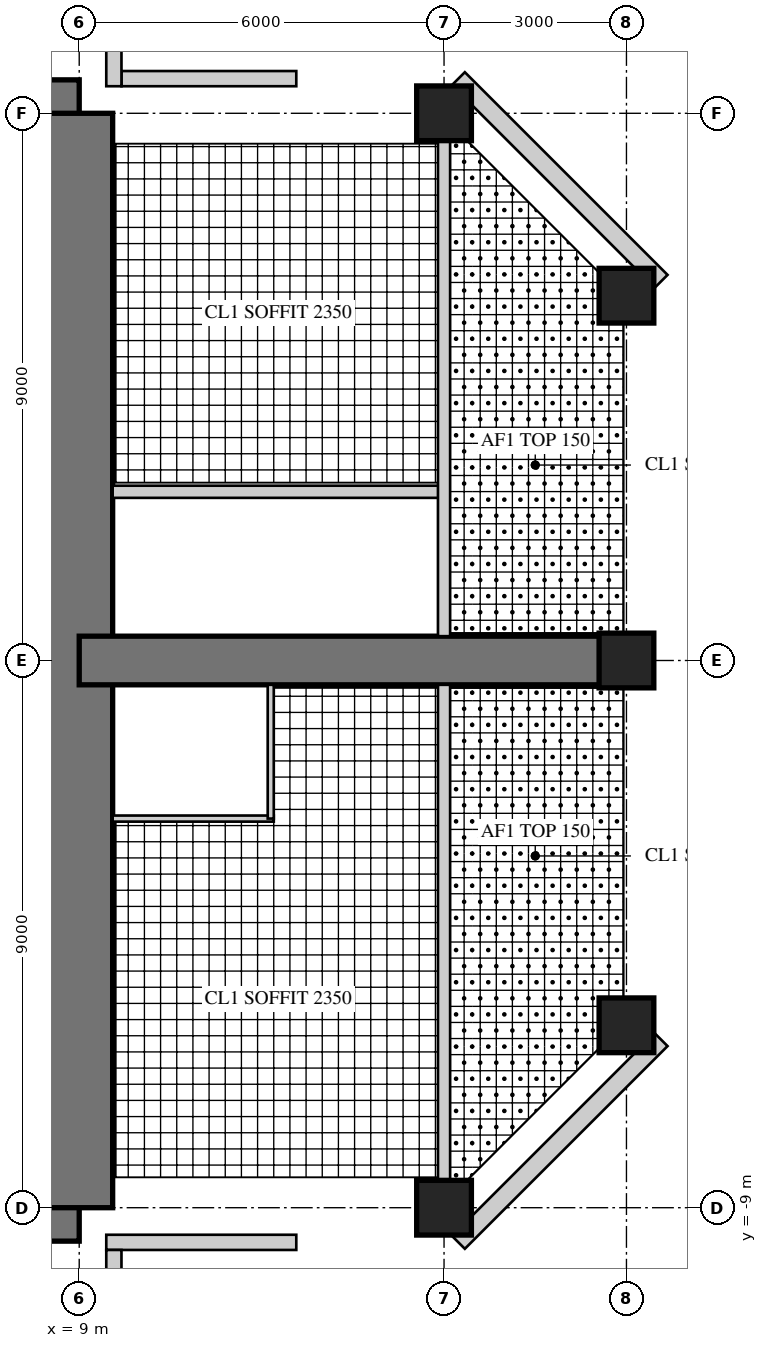
"""IFC4 building model, lengths in metres.
Left out: names, types, materials, properties, quantities, classifications, styles, units other than length and angle.
Written with IfcOpenShell. Run it as: python <this file> out.ifc"""

import sys

from ifc_helpers import new_model, si_unit, direction, frame, frame_2d, origin, origin_2d, place, context, subcontext, project, spatial, rectangle, hollow_rectangle, extrude, element, fill, save


model = new_model("IFC4")
c1 = context("Model", 3, precision=1e-05, world=origin(), true_north=direction((0.0, 1.0)))
c2 = subcontext(c1, "Body", "Model", "MODEL_VIEW")
j1 = project(units=[si_unit("LENGTHUNIT", "METRE"), si_unit("PLANEANGLEUNIT", "RADIAN")], contexts=[c1])
p1 = place(None, origin())
s1 = spatial("IfcSite", under=j1, at=p1, CompositionType="ELEMENT")
p2 = place(p1, origin())
s2 = spatial("IfcBuilding", under=s1, at=p2, CompositionType="ELEMENT")
p3 = place(p2, frame((0.0, 0.0, 189.9)))
s3 = spatial("IfcBuildingStorey", under=s2, at=p3, CompositionType="ELEMENT", Elevation=189.9)
p4 = place(p3, frame((9.0, 9.0, 0.0), z_axis=(0.0, 0.0, 1.0), x_axis=(-1.0, 0.0, 0.0)))
e1 = element("IfcWall", 1, at=p4, inside=s3, PredefinedType="SHEAR", context=c2, shape_type="SweptSolid", body=[
    extrude(rectangle(XDim=18.0, YDim=1.1, at=frame_2d((9.0, 0.0))), origin(), (0.0, 0.0, 1.0), 3.4),
])
p5 = place(p4, frame((9.8, 0.0, 0.0)))
e2 = element("IfcOpeningElement", 2, at=p5, cuts=e1, PredefinedType="OPENING", context=c2, shape_type="SweptSolid", body=[
    extrude(rectangle(XDim=1.0, YDim=2.4, at=frame_2d((0.5, 1.2))), frame((0.0, 0.56, 0.0), z_axis=(0.0, -1.0, 0.0), x_axis=(1.0, 0.0, 0.0)), (0.0, 0.0, 1.0), 1.12),
])
p6 = place(p3, frame((-9.0, -9.0, 0.0), z_axis=(0.0, 0.0, 1.0), x_axis=(1.0, 0.0, 0.0)))
e3 = element("IfcWall", 3, at=p6, inside=s3, PredefinedType="SHEAR", context=c2, shape_type="SweptSolid", body=[
    extrude(rectangle(XDim=18.0, YDim=1.1, at=frame_2d((9.0, 0.0))), origin(), (0.0, 0.0, 1.0), 3.4),
])
p7 = place(p6, frame((9.8, 0.0, 0.0)))
e4 = element("IfcOpeningElement", 4, at=p7, cuts=e3, PredefinedType="OPENING", context=c2, shape_type="SweptSolid", body=[
    extrude(rectangle(XDim=1.0, YDim=2.4, at=frame_2d((0.5, 1.2))), frame((0.0, 0.56, 0.0), z_axis=(0.0, -1.0, 0.0), x_axis=(1.0, 0.0, 0.0)), (0.0, 0.0, 1.0), 1.12),
])
p8 = place(p3, frame((9.0, -9.0, 0.0), z_axis=(0.0, 0.0, 1.0), x_axis=(0.0, 1.0, 0.0)))
e5 = element("IfcWall", 5, at=p8, inside=s3, PredefinedType="SHEAR", context=c2, shape_type="SweptSolid", body=[
    extrude(rectangle(XDim=18.0, YDim=1.1, at=frame_2d((9.0, 0.0))), origin(), (0.0, 0.0, 1.0), 3.4),
])
p9 = place(p8, frame((9.8, 0.0, 0.0)))
e6 = element("IfcOpeningElement", 6, at=p9, cuts=e5, PredefinedType="OPENING", context=c2, shape_type="SweptSolid", body=[
    extrude(rectangle(XDim=1.0, YDim=2.4, at=frame_2d((0.5, 1.2))), frame((0.0, 0.56, 0.0), z_axis=(0.0, -1.0, 0.0), x_axis=(1.0, 0.0, 0.0)), (0.0, 0.0, 1.0), 1.12),
])
p10 = place(p3, frame((9.0, 0.0, 0.0), z_axis=(0.0, 0.0, 1.0), x_axis=(1.0, 0.0, 0.0)))
e7 = element("IfcWall", 7, at=p10, inside=s3, PredefinedType="SHEAR", context=c2, shape_type="SweptSolid", body=[
    extrude(rectangle(XDim=9.0, YDim=0.8, at=frame_2d((4.5, 0.0))), origin(), (0.0, 0.0, 1.0), 3.4),
])
p11 = place(p10, frame((3.95, 0.0, 0.0)))
e8 = element("IfcOpeningElement", 8, at=p11, cuts=e7, PredefinedType="OPENING", context=c2, shape_type="SweptSolid", body=[
    extrude(rectangle(XDim=1.0, YDim=2.15, at=frame_2d((0.5, 1.075))), frame((0.0, 0.41, 0.0), z_axis=(0.0, -1.0, 0.0), x_axis=(1.0, 0.0, 0.0)), (0.0, 0.0, 1.0), 0.82),
])
p12 = place(p10, frame((7.0, 0.0, 0.0)))
e9 = element("IfcOpeningElement", 9, at=p12, cuts=e7, PredefinedType="OPENING", context=c2, shape_type="SweptSolid", body=[
    extrude(rectangle(XDim=1.0, YDim=2.2, at=frame_2d((0.5, 1.1))), frame((0.0, 0.41, 0.0), z_axis=(0.0, -1.0, 0.0), x_axis=(1.0, 0.0, 0.0)), (0.0, 0.0, 1.0), 0.82),
])
for number, where, z_axis, x_axis in (
    (10, (15.0, -9.0, 0.0), (0.0, 0.0, 1.0), (1.0, 0.0, 0.0)),
    (11, (15.0, 9.0, 0.0), (0.0, 0.0, 1.0), (1.0, 0.0, 0.0)),
    (12, (18.0, -6.0, 0.0), (0.0, 0.0, 1.0), (1.0, 0.0, 0.0)),
    (13, (18.0, 0.0, 0.0), (0.0, 0.0, 1.0), (1.0, 0.0, 0.0)),
    (14, (18.0, 6.0, 0.0), (0.0, 0.0, 1.0), (1.0, 0.0, 0.0)),
):
    element("IfcColumn", number, at=place(p3, frame(where, z_axis=z_axis, x_axis=x_axis)), inside=s3, PredefinedType="COLUMN", context=c2, shape_type="SweptSolid", body=[
        extrude(rectangle(XDim=0.9, YDim=0.9, at=origin_2d()), origin(), (0.0, 0.0, 1.0), 3.4),
    ])
p13 = place(p3, frame((9.445, -9.57, 0.0), z_axis=(0.0, 0.0, 1.0), x_axis=(1.0, 0.0, 0.0)))
e15 = element("IfcWall", 15, at=p13, inside=s3, PredefinedType="SOLIDWALL", context=c2, shape_type="SweptSolid", body=[
    extrude(rectangle(XDim=3.125, YDim=0.25, at=frame_2d((1.562, 0.0))), origin(), (0.0, 0.0, 1.0), 3.22),
])
p14 = place(p13, frame((0.6, 0.0, 0.0)))
e16 = element("IfcOpeningElement", 16, at=p14, cuts=e15, PredefinedType="OPENING", context=c2, shape_type="SweptSolid", body=[
    extrude(rectangle(XDim=1.0, YDim=2.2, at=frame_2d((0.5, 1.1))), frame((0.0, 0.135, 0.0), z_axis=(0.0, -1.0, 0.0), x_axis=(1.0, 0.0, 0.0)), (0.0, 0.0, 1.0), 0.27),
])
p15 = place(p3, frame((15.236, -9.57, 0.0), z_axis=(0.0, 0.0, 1.0), x_axis=(0.707106781187, 0.707106781187, 0.0)))
e17 = element("IfcWall", 17, at=p15, inside=s3, PredefinedType="SOLIDWALL", context=c2, shape_type="SweptSolid", body=[
    extrude(rectangle(XDim=4.715, YDim=0.3, at=frame_2d((2.357, 0.0))), origin(), (0.0, 0.0, 1.0), 3.22),
])
p16 = place(p15, frame((1.907, 0.0, 0.3)))
e18 = element("IfcOpeningElement", 18, at=p16, cuts=e17, PredefinedType="OPENING", context=c2, shape_type="SweptSolid", body=[
    extrude(rectangle(XDim=0.9, YDim=2.4, at=frame_2d((0.45, 1.2))), frame((0.0, 0.16, 0.0), z_axis=(0.0, -1.0, 0.0), x_axis=(1.0, 0.0, 0.0)), (0.0, 0.0, 1.0), 0.32),
])
p17 = place(p3, frame((18.57, 6.236, 0.0), z_axis=(0.0, 0.0, 1.0), x_axis=(-0.707106781187, 0.707106781187, 0.0)))
e19 = element("IfcWall", 19, at=p17, inside=s3, PredefinedType="SOLIDWALL", context=c2, shape_type="SweptSolid", body=[
    extrude(rectangle(XDim=4.715, YDim=0.3, at=frame_2d((2.357, 0.0))), origin(), (0.0, 0.0, 1.0), 3.22),
])
p18 = place(p17, frame((1.907, 0.0, 0.3)))
e20 = element("IfcOpeningElement", 20, at=p18, cuts=e19, PredefinedType="OPENING", context=c2, shape_type="SweptSolid", body=[
    extrude(rectangle(XDim=0.9, YDim=2.4, at=frame_2d((0.45, 1.2))), frame((0.0, 0.16, 0.0), z_axis=(0.0, -1.0, 0.0), x_axis=(1.0, 0.0, 0.0)), (0.0, 0.0, 1.0), 0.32),
])
p19 = place(p3, frame((12.57, 9.57, 0.0), z_axis=(0.0, 0.0, 1.0), x_axis=(-1.0, 0.0, 0.0)))
e21 = element("IfcWall", 21, at=p19, inside=s3, PredefinedType="SOLIDWALL", context=c2, shape_type="SweptSolid", body=[
    extrude(rectangle(XDim=2.875, YDim=0.25, at=frame_2d((1.438, 0.0))), origin(), (0.0, 0.0, 1.0), 3.22),
])
p20 = place(p19, frame((0.6, 0.0, 0.0)))
e22 = element("IfcOpeningElement", 22, at=p20, cuts=e21, PredefinedType="OPENING", context=c2, shape_type="SweptSolid", body=[
    extrude(rectangle(XDim=1.0, YDim=2.2, at=frame_2d((0.5, 1.1))), frame((0.0, 0.135, 0.0), z_axis=(0.0, -1.0, 0.0), x_axis=(1.0, 0.0, 0.0)), (0.0, 0.0, 1.0), 0.27),
])
p21 = place(p3, frame((9.57, 9.445, 0.0), z_axis=(0.0, 0.0, 1.0), x_axis=(0.0, 1.0, 0.0)))
e23 = element("IfcWall", 23, at=p21, inside=s3, PredefinedType="SOLIDWALL", context=c2, shape_type="SweptSolid", body=[
    extrude(rectangle(XDim=3.125, YDim=0.25, at=frame_2d((1.562, 0.0))), origin(), (0.0, 0.0, 1.0), 3.22),
])
p22 = place(p21, frame((0.6, 0.0, 0.0)))
e24 = element("IfcOpeningElement", 24, at=p22, cuts=e23, PredefinedType="OPENING", context=c2, shape_type="SweptSolid", body=[
    extrude(rectangle(XDim=1.0, YDim=2.2, at=frame_2d((0.5, 1.1))), frame((0.0, 0.135, 0.0), z_axis=(0.0, -1.0, 0.0), x_axis=(1.0, 0.0, 0.0)), (0.0, 0.0, 1.0), 0.27),
])
p23 = place(p3, frame((9.57, -12.57, 0.0), z_axis=(0.0, 0.0, 1.0), x_axis=(0.0, 1.0, 0.0)))
e25 = element("IfcWall", 25, at=p23, inside=s3, PredefinedType="SOLIDWALL", context=c2, shape_type="SweptSolid", body=[
    extrude(rectangle(XDim=2.875, YDim=0.25, at=frame_2d((1.438, 0.0))), origin(), (0.0, 0.0, 1.0), 3.22),
])
p24 = place(p23, frame((0.6, 0.0, 0.0)))
e26 = element("IfcOpeningElement", 26, at=p24, cuts=e25, PredefinedType="OPENING", context=c2, shape_type="SweptSolid", body=[
    extrude(rectangle(XDim=1.0, YDim=2.2, at=frame_2d((0.5, 1.1))), frame((0.0, 0.135, 0.0), z_axis=(0.0, -1.0, 0.0), x_axis=(1.0, 0.0, 0.0)), (0.0, 0.0, 1.0), 0.27),
])
p25 = place(p3, frame((9.55, -2.6, 0.0), z_axis=(0.0, 0.0, 1.0), x_axis=(1.0, 0.0, 0.0)))
e27 = element("IfcWall", 27, at=p25, inside=s3, PredefinedType="PARTITIONING", context=c2, shape_type="SweptSolid", body=[
    extrude(rectangle(XDim=2.65, YDim=0.1, at=frame_2d((1.325, 0.0))), origin(), (0.0, 0.0, 1.0), 3.22),
])
p26 = place(p3, frame((12.15, -2.6, 0.0), z_axis=(0.0, 0.0, 1.0), x_axis=(0.0, 1.0, 0.0)))
e28 = element("IfcWall", 28, at=p26, inside=s3, PredefinedType="PARTITIONING", context=c2, shape_type="SweptSolid", body=[
    extrude(rectangle(XDim=2.2, YDim=0.1, at=frame_2d((1.1, 0.0))), origin(), (0.0, 0.0, 1.0), 3.22),
])
p27 = place(p26, frame((0.55, 0.0, 0.0)))
e29 = element("IfcOpeningElement", 29, at=p27, cuts=e28, PredefinedType="OPENING", context=c2, shape_type="SweptSolid", body=[
    extrude(rectangle(XDim=0.9, YDim=2.1, at=frame_2d((0.45, 1.05))), frame((0.0, 0.06, 0.0), z_axis=(0.0, -1.0, 0.0), x_axis=(1.0, 0.0, 0.0)), (0.0, 0.0, 1.0), 0.12),
])
p28 = place(p3, frame((9.55, 2.775, 0.0), z_axis=(0.0, 0.0, 1.0), x_axis=(1.0, 0.0, 0.0)))
e30 = element("IfcWall", 30, at=p28, inside=s3, PredefinedType="SOLIDWALL", context=c2, shape_type="SweptSolid", body=[
    extrude(rectangle(XDim=5.45, YDim=0.2, at=frame_2d((2.725, 0.0))), origin(), (0.0, 0.0, 1.0), 3.22),
])
p29 = place(p28, frame((1.2, 0.0, 0.0)))
e31 = element("IfcOpeningElement", 31, at=p29, cuts=e30, PredefinedType="OPENING", context=c2, shape_type="SweptSolid", body=[
    extrude(rectangle(XDim=1.0, YDim=2.2, at=frame_2d((0.5, 1.1))), frame((0.0, 0.11, 0.0), z_axis=(0.0, -1.0, 0.0), x_axis=(1.0, 0.0, 0.0)), (0.0, 0.0, 1.0), 0.22),
])
p30 = place(p3, frame((15.0, -8.55, 0.0), z_axis=(0.0, 0.0, 1.0), x_axis=(0.0, 1.0, 0.0)))
e32 = element("IfcWall", 32, at=p30, inside=s3, PredefinedType="SOLIDWALL", context=c2, shape_type="SweptSolid", body=[
    extrude(rectangle(XDim=8.15, YDim=0.2, at=frame_2d((4.075, 0.0))), origin(), (0.0, 0.0, 1.0), 2.47),
])
p31 = place(p3, frame((15.0, 0.4, 0.0), z_axis=(0.0, 0.0, 1.0), x_axis=(0.0, 1.0, 0.0)))
e33 = element("IfcWall", 33, at=p31, inside=s3, PredefinedType="SOLIDWALL", context=c2, shape_type="SweptSolid", body=[
    extrude(rectangle(XDim=8.15, YDim=0.2, at=frame_2d((4.075, 0.0))), origin(), (0.0, 0.0, 1.0), 2.47),
])
p32 = place(p31, frame((0.4, 0.0, 0.0)))
e34 = element("IfcOpeningElement", 34, at=p32, cuts=e33, PredefinedType="OPENING", context=c2, shape_type="SweptSolid", body=[
    extrude(rectangle(XDim=1.0, YDim=2.2, at=frame_2d((0.5, 1.1))), frame((0.0, 0.11, 0.0), z_axis=(0.0, -1.0, 0.0), x_axis=(1.0, 0.0, 0.0)), (0.0, 0.0, 1.0), 0.22),
])
p33 = place(p14, origin())
e35 = element("IfcDoor", 35, at=p33, inside=s3, OperationType="SINGLE_SWING_LEFT", PredefinedType="DOOR", context=c2, shape_type="SweptSolid", body=[
    extrude(hollow_rectangle(XDim=1.0, YDim=2.2, WallThickness=0.06, at=frame_2d((0.5, 1.1))), frame((0.0, 0.025, 0.0), z_axis=(0.0, -1.0, 0.0), x_axis=(1.0, 0.0, 0.0)), (0.0, 0.0, 1.0), 0.05),
    extrude(rectangle(XDim=0.879, YDim=2.079, at=frame_2d((0.5, 1.1))), frame((0.0, 0.025, 0.0), z_axis=(0.0, -1.0, 0.0), x_axis=(1.0, 0.0, 0.0)), (0.0, 0.0, 1.0), 0.05),
])
fill(e16, e35)
p34 = place(p16, origin())
e36 = element("IfcWindow", 36, at=p34, inside=s3, PartitioningType="SINGLE_PANEL", PredefinedType="WINDOW", context=c2, shape_type="SweptSolid", body=[
    extrude(hollow_rectangle(XDim=0.9, YDim=2.4, WallThickness=0.06, at=frame_2d((0.45, 1.2))), frame((0.0, 0.03, 0.0), z_axis=(0.0, -1.0, 0.0), x_axis=(1.0, 0.0, 0.0)), (0.0, 0.0, 1.0), 0.06),
    extrude(rectangle(XDim=0.779, YDim=2.279, at=frame_2d((0.45, 1.2))), frame((0.0, 0.03, 0.0), z_axis=(0.0, -1.0, 0.0), x_axis=(1.0, 0.0, 0.0)), (0.0, 0.0, 1.0), 0.06),
])
fill(e18, e36)
p35 = place(p18, origin())
e37 = element("IfcWindow", 37, at=p35, inside=s3, PartitioningType="SINGLE_PANEL", PredefinedType="WINDOW", context=c2, shape_type="SweptSolid", body=[
    extrude(hollow_rectangle(XDim=0.9, YDim=2.4, WallThickness=0.06, at=frame_2d((0.45, 1.2))), frame((0.0, 0.03, 0.0), z_axis=(0.0, -1.0, 0.0), x_axis=(1.0, 0.0, 0.0)), (0.0, 0.0, 1.0), 0.06),
    extrude(rectangle(XDim=0.779, YDim=2.279, at=frame_2d((0.45, 1.2))), frame((0.0, 0.03, 0.0), z_axis=(0.0, -1.0, 0.0), x_axis=(1.0, 0.0, 0.0)), (0.0, 0.0, 1.0), 0.06),
])
fill(e20, e37)
p36 = place(p20, origin())
e38 = element("IfcDoor", 38, at=p36, inside=s3, OperationType="SINGLE_SWING_RIGHT", PredefinedType="DOOR", context=c2, shape_type="SweptSolid", body=[
    extrude(hollow_rectangle(XDim=1.0, YDim=2.2, WallThickness=0.06, at=frame_2d((0.5, 1.1))), frame((0.0, 0.025, 0.0), z_axis=(0.0, -1.0, 0.0), x_axis=(1.0, 0.0, 0.0)), (0.0, 0.0, 1.0), 0.05),
    extrude(rectangle(XDim=0.879, YDim=2.079, at=frame_2d((0.5, 1.1))), frame((0.0, 0.025, 0.0), z_axis=(0.0, -1.0, 0.0), x_axis=(1.0, 0.0, 0.0)), (0.0, 0.0, 1.0), 0.05),
])
fill(e22, e38)
p37 = place(p27, origin())
e39 = element("IfcDoor", 39, at=p37, inside=s3, OperationType="SINGLE_SWING_LEFT", PredefinedType="DOOR", context=c2, shape_type="SweptSolid", body=[
    extrude(rectangle(XDim=0.9, YDim=2.1, at=frame_2d((0.45, 1.05))), frame((0.0, 0.025, 0.0), z_axis=(0.0, -1.0, 0.0), x_axis=(1.0, 0.0, 0.0)), (0.0, 0.0, 1.0), 0.05),
])
fill(e29, e39)
p38 = place(p29, origin())
e40 = element("IfcDoor", 40, at=p38, inside=s3, OperationType="SINGLE_SWING_LEFT", PredefinedType="DOOR", context=c2, shape_type="SweptSolid", body=[
    extrude(rectangle(XDim=1.0, YDim=2.2, at=frame_2d((0.5, 1.1))), frame((0.0, 0.025, 0.0), z_axis=(0.0, -1.0, 0.0), x_axis=(1.0, 0.0, 0.0)), (0.0, 0.0, 1.0), 0.05),
])
fill(e31, e40)
p39 = place(p32, frame((1.0, 0.0, 0.0), z_axis=(0.0, 0.0, 1.0), x_axis=(-1.0, 0.0, 0.0)))
e41 = element("IfcDoor", 41, at=p39, inside=s3, OperationType="SINGLE_SWING_LEFT", PredefinedType="DOOR", context=c2, shape_type="SweptSolid", body=[
    extrude(rectangle(XDim=1.0, YDim=2.2, at=frame_2d((0.5, 1.1))), frame((0.0, 0.025, 0.0), z_axis=(0.0, -1.0, 0.0), x_axis=(1.0, 0.0, 0.0)), (0.0, 0.0, 1.0), 0.05),
])
fill(e34, e41)
p40 = place(p11, frame((1.0, 0.0, 0.0), z_axis=(0.0, 0.0, 1.0), x_axis=(-1.0, 0.0, 0.0)))
e42 = element("IfcDoor", 42, at=p40, inside=s3, OperationType="SINGLE_SWING_RIGHT", PredefinedType="DOOR", context=c2, shape_type="SweptSolid", body=[
    extrude(rectangle(XDim=1.0, YDim=2.15, at=frame_2d((0.5, 1.075))), frame((0.0, 0.025, 0.0), z_axis=(0.0, -1.0, 0.0), x_axis=(1.0, 0.0, 0.0)), (0.0, 0.0, 1.0), 0.05),
])
fill(e8, e42)
p41 = place(p12, origin())
e43 = element("IfcDoor", 43, at=p41, inside=s3, OperationType="SINGLE_SWING_LEFT", PredefinedType="DOOR", context=c2, shape_type="SweptSolid", body=[
    extrude(rectangle(XDim=1.0, YDim=2.2, at=frame_2d((0.5, 1.1))), frame((0.0, 0.025, 0.0), z_axis=(0.0, -1.0, 0.0), x_axis=(1.0, 0.0, 0.0)), (0.0, 0.0, 1.0), 0.05),
])
fill(e9, e43)
p42 = place(p9, origin())
e44 = element("IfcDoor", 44, at=p42, inside=s3, OperationType="SINGLE_SWING_RIGHT", PredefinedType="DOOR", context=c2, shape_type="SweptSolid", body=[
    extrude(rectangle(XDim=1.0, YDim=2.4, at=frame_2d((0.5, 1.2))), frame((0.0, 0.055, 0.0), z_axis=(0.0, -1.0, 0.0), x_axis=(1.0, 0.0, 0.0)), (0.0, 0.0, 1.0), 0.05),
])
fill(e6, e44)
save(model, sys.argv[1])
